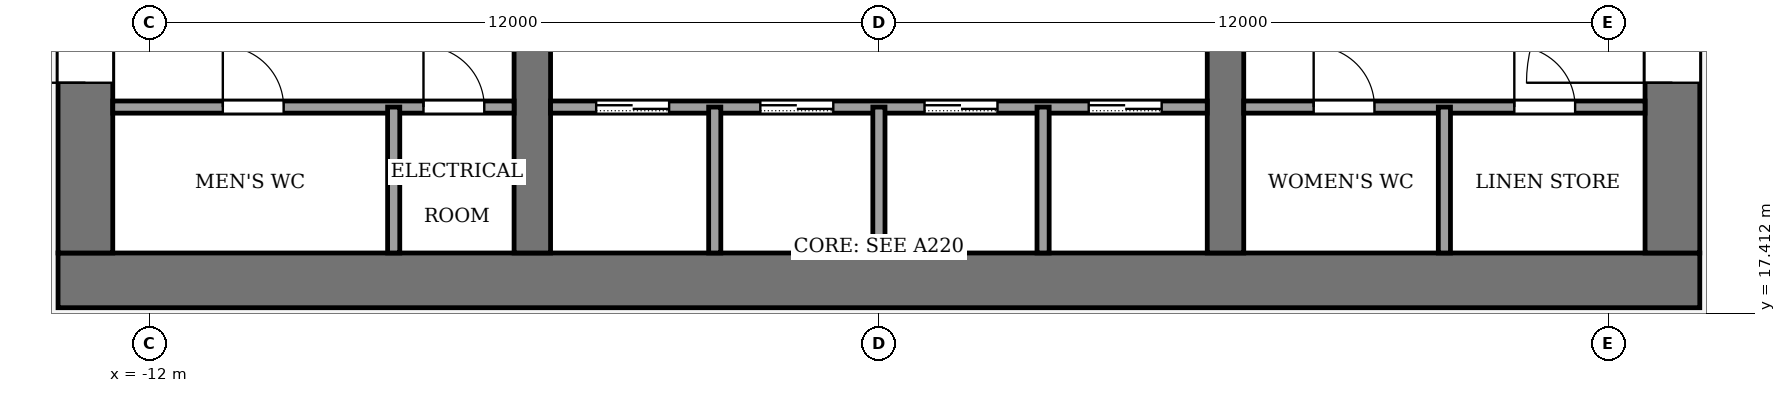
"""IFC4 building model, lengths in metres.
Left out: names, types, materials, properties, quantities, classifications, styles, units other than length and angle.
Written with IfcOpenShell. Run it as: python <this file> out.ifc"""

import sys

from ifc_helpers import new_model, si_unit, direction, frame, frame_2d, origin, place, context, subcontext, project, spatial, rectangle, extrude, element, fill, save


model = new_model("IFC4")
c1 = context("Model", 3, precision=1e-05, world=origin(), true_north=direction((0.0, 1.0)))
c2 = subcontext(c1, "Body", "Model", "MODEL_VIEW")
j1 = project(units=[si_unit("LENGTHUNIT", "METRE"), si_unit("PLANEANGLEUNIT", "RADIAN")], contexts=[c1])
p1 = place(None, origin())
s1 = spatial("IfcSite", under=j1, at=p1, CompositionType="ELEMENT")
p2 = place(p1, origin())
s2 = spatial("IfcBuilding", under=s1, at=p2, CompositionType="ELEMENT")
p3 = place(p2, frame((0.0, 0.0, 186.0)))
s3 = spatial("IfcBuildingStorey", under=s2, at=p3, CompositionType="ELEMENT", Elevation=186.0)
p4 = place(p3, frame((-13.5, 17.95, -0.13), z_axis=(0.0, 0.0, 1.0), x_axis=(1.0, 0.0, 0.0)))
e1 = element("IfcWall", 1, at=p4, inside=s3, PredefinedType="SHEAR", context=c2, shape_type="SweptSolid", body=[
    extrude(rectangle(XDim=27.0, YDim=0.9, at=frame_2d((13.5, 0.0))), origin(), (0.0, 0.0, 1.0), 4.0),
])
p5 = place(p3, frame((-13.05, 18.4, -0.13), z_axis=(0.0, 0.0, 1.0), x_axis=(0.0, 1.0, 0.0)))
e2 = element("IfcWall", 2, at=p5, inside=s3, PredefinedType="SHEAR", context=c2, shape_type="SweptSolid", body=[
    extrude(rectangle(XDim=19.2, YDim=0.9, at=frame_2d((9.6, 0.0))), origin(), (0.0, 0.0, 1.0), 4.0),
])
p6 = place(p5, frame((2.8, 0.0, 0.13)))
e3 = element("IfcOpeningElement", 3, at=p6, cuts=e2, PredefinedType="OPENING", context=c2, shape_type="SweptSolid", body=[
    extrude(rectangle(XDim=2.4, YDim=2.4, at=frame_2d((1.2, 1.2))), frame((0.0, 0.46, 0.0), z_axis=(0.0, -1.0, 0.0), x_axis=(1.0, 0.0, 0.0)), (0.0, 0.0, 1.0), 0.92),
])
p7 = place(p5, frame((13.4, 0.0, 0.13)))
e4 = element("IfcOpeningElement", 4, at=p7, cuts=e2, PredefinedType="OPENING", context=c2, shape_type="SweptSolid", body=[
    extrude(rectangle(XDim=1.4, YDim=2.2, at=frame_2d((0.7, 1.1))), frame((0.0, 0.46, 0.0), z_axis=(0.0, -1.0, 0.0), x_axis=(1.0, 0.0, 0.0)), (0.0, 0.0, 1.0), 0.92),
])
p8 = place(p3, frame((13.05, 18.4, -0.13), z_axis=(0.0, 0.0, 1.0), x_axis=(0.0, 1.0, 0.0)))
e5 = element("IfcWall", 5, at=p8, inside=s3, PredefinedType="SHEAR", context=c2, shape_type="SweptSolid", body=[
    extrude(rectangle(XDim=19.2, YDim=0.9, at=frame_2d((9.6, 0.0))), origin(), (0.0, 0.0, 1.0), 4.0),
])
p9 = place(p8, frame((2.8, 0.0, 0.13)))
e6 = element("IfcOpeningElement", 6, at=p9, cuts=e5, PredefinedType="OPENING", context=c2, shape_type="SweptSolid", body=[
    extrude(rectangle(XDim=2.4, YDim=2.4, at=frame_2d((1.2, 1.2))), frame((0.0, 0.46, 0.0), z_axis=(0.0, -1.0, 0.0), x_axis=(1.0, 0.0, 0.0)), (0.0, 0.0, 1.0), 0.92),
])
p10 = place(p8, frame((13.3, 0.0, 0.13)))
e7 = element("IfcOpeningElement", 7, at=p10, cuts=e5, PredefinedType="OPENING", context=c2, shape_type="SweptSolid", body=[
    extrude(rectangle(XDim=2.4, YDim=2.4, at=frame_2d((1.2, 1.2))), frame((0.0, 0.46, 0.0), z_axis=(0.0, -1.0, 0.0), x_axis=(1.0, 0.0, 0.0)), (0.0, 0.0, 1.0), 0.92),
])
p11 = place(p3, frame((-5.7, 18.4, -0.13), z_axis=(0.0, 0.0, 1.0), x_axis=(0.0, 1.0, 0.0)))
e8 = element("IfcWall", 8, at=p11, inside=s3, PredefinedType="SHEAR", context=c2, shape_type="SweptSolid", body=[
    extrude(rectangle(XDim=19.2, YDim=0.6, at=frame_2d((9.6, 0.0))), origin(), (0.0, 0.0, 1.0), 4.0),
])
p12 = place(p11, frame((8.35, 0.0, 0.13)))
e9 = element("IfcOpeningElement", 9, at=p12, cuts=e8, PredefinedType="OPENING", context=c2, shape_type="SweptSolid", body=[
    extrude(rectangle(XDim=0.9, YDim=2.1, at=frame_2d((0.45, 1.05))), frame((0.0, 0.31, 0.0), z_axis=(0.0, -1.0, 0.0), x_axis=(1.0, 0.0, 0.0)), (0.0, 0.0, 1.0), 0.62),
])
p13 = place(p3, frame((5.7, 18.4, -0.13), z_axis=(0.0, 0.0, 1.0), x_axis=(0.0, 1.0, 0.0)))
e10 = element("IfcWall", 10, at=p13, inside=s3, PredefinedType="SHEAR", context=c2, shape_type="SweptSolid", body=[
    extrude(rectangle(XDim=19.2, YDim=0.6, at=frame_2d((9.6, 0.0))), origin(), (0.0, 0.0, 1.0), 4.0),
])
p14 = place(p13, frame((8.35, 0.0, 0.13)))
e11 = element("IfcOpeningElement", 11, at=p14, cuts=e10, PredefinedType="OPENING", context=c2, shape_type="SweptSolid", body=[
    extrude(rectangle(XDim=0.9, YDim=2.1, at=frame_2d((0.45, 1.05))), frame((0.0, 0.31, 0.0), z_axis=(0.0, -1.0, 0.0), x_axis=(1.0, 0.0, 0.0)), (0.0, 0.0, 1.0), 0.62),
])
p15 = place(p13, frame((13.3, 0.0, 0.13)))
e12 = element("IfcOpeningElement", 12, at=p15, cuts=e10, PredefinedType="OPENING", context=c2, shape_type="SweptSolid", body=[
    extrude(rectangle(XDim=2.4, YDim=2.4, at=frame_2d((1.2, 1.2))), frame((0.0, 0.31, 0.0), z_axis=(0.0, -1.0, 0.0), x_axis=(1.0, 0.0, 0.0)), (0.0, 0.0, 1.0), 0.62),
])
p16 = place(p3, frame((-12.6, 20.8, 0.0), z_axis=(0.0, 0.0, 1.0), x_axis=(1.0, 0.0, 0.0)))
e13 = element("IfcWall", 13, at=p16, inside=s3, PredefinedType="PARTITIONING", context=c2, shape_type="SweptSolid", body=[
    extrude(rectangle(XDim=6.6, YDim=0.2, at=frame_2d((3.3, 0.0))), origin(), (0.0, 0.0, 1.0), 3.87),
])
p17 = place(p16, frame((1.81, 0.0, 0.0)))
e14 = element("IfcOpeningElement", 14, at=p17, cuts=e13, PredefinedType="OPENING", context=c2, shape_type="SweptSolid", body=[
    extrude(rectangle(XDim=1.0, YDim=2.1, at=frame_2d((0.5, 1.05))), frame((0.0, 0.11, 0.0), z_axis=(0.0, -1.0, 0.0), x_axis=(1.0, 0.0, 0.0)), (0.0, 0.0, 1.0), 0.22),
])
p18 = place(p16, frame((5.11, 0.0, 0.0)))
e15 = element("IfcOpeningElement", 15, at=p18, cuts=e13, PredefinedType="OPENING", context=c2, shape_type="SweptSolid", body=[
    extrude(rectangle(XDim=1.0, YDim=2.1, at=frame_2d((0.5, 1.05))), frame((0.0, 0.11, 0.0), z_axis=(0.0, -1.0, 0.0), x_axis=(1.0, 0.0, 0.0)), (0.0, 0.0, 1.0), 0.22),
])
p19 = place(p3, frame((-5.4, 20.8, 0.0), z_axis=(0.0, 0.0, 1.0), x_axis=(1.0, 0.0, 0.0)))
e16 = element("IfcWall", 16, at=p19, inside=s3, PredefinedType="PARTITIONING", context=c2, shape_type="SweptSolid", body=[
    extrude(rectangle(XDim=10.8, YDim=0.2, at=frame_2d((5.4, 0.0))), origin(), (0.0, 0.0, 1.0), 3.87),
])
p20 = place(p19, frame((0.75, 0.0, 0.0)))
e17 = element("IfcOpeningElement", 17, at=p20, cuts=e16, PredefinedType="OPENING", context=c2, shape_type="SweptSolid", body=[
    extrude(rectangle(XDim=1.2, YDim=2.2, at=frame_2d((0.6, 1.1))), frame((0.0, 0.11, 0.0), z_axis=(0.0, -1.0, 0.0), x_axis=(1.0, 0.0, 0.0)), (0.0, 0.0, 1.0), 0.22),
])
p21 = place(p19, frame((3.45, 0.0, 0.0)))
e18 = element("IfcOpeningElement", 18, at=p21, cuts=e16, PredefinedType="OPENING", context=c2, shape_type="SweptSolid", body=[
    extrude(rectangle(XDim=1.2, YDim=2.2, at=frame_2d((0.6, 1.1))), frame((0.0, 0.11, 0.0), z_axis=(0.0, -1.0, 0.0), x_axis=(1.0, 0.0, 0.0)), (0.0, 0.0, 1.0), 0.22),
])
p22 = place(p19, frame((6.15, 0.0, 0.0)))
e19 = element("IfcOpeningElement", 19, at=p22, cuts=e16, PredefinedType="OPENING", context=c2, shape_type="SweptSolid", body=[
    extrude(rectangle(XDim=1.2, YDim=2.2, at=frame_2d((0.6, 1.1))), frame((0.0, 0.11, 0.0), z_axis=(0.0, -1.0, 0.0), x_axis=(1.0, 0.0, 0.0)), (0.0, 0.0, 1.0), 0.22),
])
p23 = place(p19, frame((8.85, 0.0, 0.0)))
e20 = element("IfcOpeningElement", 20, at=p23, cuts=e16, PredefinedType="OPENING", context=c2, shape_type="SweptSolid", body=[
    extrude(rectangle(XDim=1.2, YDim=2.2, at=frame_2d((0.6, 1.1))), frame((0.0, 0.11, 0.0), z_axis=(0.0, -1.0, 0.0), x_axis=(1.0, 0.0, 0.0)), (0.0, 0.0, 1.0), 0.22),
])
p24 = place(p3, frame((6.0, 20.8, 0.0), z_axis=(0.0, 0.0, 1.0), x_axis=(1.0, 0.0, 0.0)))
e21 = element("IfcWall", 21, at=p24, inside=s3, PredefinedType="PARTITIONING", context=c2, shape_type="SweptSolid", body=[
    extrude(rectangle(XDim=6.6, YDim=0.2, at=frame_2d((3.3, 0.0))), origin(), (0.0, 0.0, 1.0), 3.87),
])
p25 = place(p24, frame((1.15, 0.0, 0.0)))
e22 = element("IfcOpeningElement", 22, at=p25, cuts=e21, PredefinedType="OPENING", context=c2, shape_type="SweptSolid", body=[
    extrude(rectangle(XDim=1.0, YDim=2.1, at=frame_2d((0.5, 1.05))), frame((0.0, 0.11, 0.0), z_axis=(0.0, -1.0, 0.0), x_axis=(1.0, 0.0, 0.0)), (0.0, 0.0, 1.0), 0.22),
])
p26 = place(p24, frame((4.45, 0.0, 0.0)))
e23 = element("IfcOpeningElement", 23, at=p26, cuts=e21, PredefinedType="OPENING", context=c2, shape_type="SweptSolid", body=[
    extrude(rectangle(XDim=1.0, YDim=2.1, at=frame_2d((0.5, 1.05))), frame((0.0, 0.11, 0.0), z_axis=(0.0, -1.0, 0.0), x_axis=(1.0, 0.0, 0.0)), (0.0, 0.0, 1.0), 0.22),
])
for number, where, z_axis, x_axis in (
    (24, (-7.98, 18.4, 0.0), (0.0, 0.0, 1.0), (0.0, 1.0, 0.0)),
    (25, (-2.7, 18.4, 0.0), (0.0, 0.0, 1.0), (0.0, 1.0, 0.0)),
    (26, (0.0, 18.4, 0.0), (0.0, 0.0, 1.0), (0.0, 1.0, 0.0)),
    (27, (2.7, 18.4, 0.0), (0.0, 0.0, 1.0), (0.0, 1.0, 0.0)),
    (28, (9.3, 18.4, 0.0), (0.0, 0.0, 1.0), (0.0, 1.0, 0.0)),
):
    element("IfcWall", number, at=place(p3, frame(where, z_axis=z_axis, x_axis=x_axis)), inside=s3, PredefinedType="PARTITIONING", context=c2, shape_type="SweptSolid", body=[
        extrude(rectangle(XDim=2.4, YDim=0.2, at=frame_2d((1.2, 0.0))), origin(), (0.0, 0.0, 1.0), 3.87),
    ])
p27 = place(p20, origin())
e29 = element("IfcDoor", 29, at=p27, inside=s3, OperationType="SLIDING_TO_LEFT", PredefinedType="DOOR", context=c2, shape_type="SweptSolid", body=[
    extrude(rectangle(XDim=1.2, YDim=2.2, at=frame_2d((0.6, 1.1))), frame((0.0, 0.025, 0.0), z_axis=(0.0, -1.0, 0.0), x_axis=(1.0, 0.0, 0.0)), (0.0, 0.0, 1.0), 0.05),
])
fill(e17, e29)
p28 = place(p21, origin())
e30 = element("IfcDoor", 30, at=p28, inside=s3, OperationType="SLIDING_TO_LEFT", PredefinedType="DOOR", context=c2, shape_type="SweptSolid", body=[
    extrude(rectangle(XDim=1.2, YDim=2.2, at=frame_2d((0.6, 1.1))), frame((0.0, 0.025, 0.0), z_axis=(0.0, -1.0, 0.0), x_axis=(1.0, 0.0, 0.0)), (0.0, 0.0, 1.0), 0.05),
])
fill(e18, e30)
p29 = place(p22, origin())
e31 = element("IfcDoor", 31, at=p29, inside=s3, OperationType="SLIDING_TO_LEFT", PredefinedType="DOOR", context=c2, shape_type="SweptSolid", body=[
    extrude(rectangle(XDim=1.2, YDim=2.2, at=frame_2d((0.6, 1.1))), frame((0.0, 0.025, 0.0), z_axis=(0.0, -1.0, 0.0), x_axis=(1.0, 0.0, 0.0)), (0.0, 0.0, 1.0), 0.05),
])
fill(e19, e31)
p30 = place(p23, origin())
e32 = element("IfcDoor", 32, at=p30, inside=s3, OperationType="SLIDING_TO_LEFT", PredefinedType="DOOR", context=c2, shape_type="SweptSolid", body=[
    extrude(rectangle(XDim=1.2, YDim=2.2, at=frame_2d((0.6, 1.1))), frame((0.0, 0.025, 0.0), z_axis=(0.0, -1.0, 0.0), x_axis=(1.0, 0.0, 0.0)), (0.0, 0.0, 1.0), 0.05),
])
fill(e20, e32)
p31 = place(p17, origin())
e33 = element("IfcDoor", 33, at=p31, inside=s3, OperationType="SINGLE_SWING_LEFT", PredefinedType="DOOR", context=c2, shape_type="SweptSolid", body=[
    extrude(rectangle(XDim=1.0, YDim=2.1, at=frame_2d((0.5, 1.05))), frame((0.0, 0.025, 0.0), z_axis=(0.0, -1.0, 0.0), x_axis=(1.0, 0.0, 0.0)), (0.0, 0.0, 1.0), 0.05),
])
fill(e14, e33)
p32 = place(p18, origin())
e34 = element("IfcDoor", 34, at=p32, inside=s3, OperationType="SINGLE_SWING_LEFT", PredefinedType="DOOR", context=c2, shape_type="SweptSolid", body=[
    extrude(rectangle(XDim=1.0, YDim=2.1, at=frame_2d((0.5, 1.05))), frame((0.0, 0.025, 0.0), z_axis=(0.0, -1.0, 0.0), x_axis=(1.0, 0.0, 0.0)), (0.0, 0.0, 1.0), 0.05),
])
fill(e15, e34)
p33 = place(p25, origin())
e35 = element("IfcDoor", 35, at=p33, inside=s3, OperationType="SINGLE_SWING_LEFT", PredefinedType="DOOR", context=c2, shape_type="SweptSolid", body=[
    extrude(rectangle(XDim=1.0, YDim=2.1, at=frame_2d((0.5, 1.05))), frame((0.0, 0.025, 0.0), z_axis=(0.0, -1.0, 0.0), x_axis=(1.0, 0.0, 0.0)), (0.0, 0.0, 1.0), 0.05),
])
fill(e22, e35)
p34 = place(p26, origin())
e36 = element("IfcDoor", 36, at=p34, inside=s3, OperationType="SINGLE_SWING_LEFT", PredefinedType="DOOR", context=c2, shape_type="SweptSolid", body=[
    extrude(rectangle(XDim=1.0, YDim=2.1, at=frame_2d((0.5, 1.05))), frame((0.0, 0.025, 0.0), z_axis=(0.0, -1.0, 0.0), x_axis=(1.0, 0.0, 0.0)), (0.0, 0.0, 1.0), 0.05),
])
fill(e23, e36)
p35 = place(p6, origin())
e37 = element("IfcDoor", 37, at=p35, inside=s3, OperationType="DOUBLE_DOOR_SINGLE_SWING", PredefinedType="DOOR", context=c2, shape_type="SweptSolid", body=[
    extrude(rectangle(XDim=2.4, YDim=2.4, at=frame_2d((1.2, 1.2))), frame((0.0, 0.025, 0.0), z_axis=(0.0, -1.0, 0.0), x_axis=(1.0, 0.0, 0.0)), (0.0, 0.0, 1.0), 0.05),
])
fill(e3, e37)
p36 = place(p9, origin())
e38 = element("IfcDoor", 38, at=p36, inside=s3, OperationType="DOUBLE_DOOR_SINGLE_SWING", PredefinedType="DOOR", context=c2, shape_type="SweptSolid", body=[
    extrude(rectangle(XDim=2.4, YDim=2.4, at=frame_2d((1.2, 1.2))), frame((0.0, 0.025, 0.0), z_axis=(0.0, -1.0, 0.0), x_axis=(1.0, 0.0, 0.0)), (0.0, 0.0, 1.0), 0.05),
])
fill(e6, e38)
save(model, sys.argv[1])
